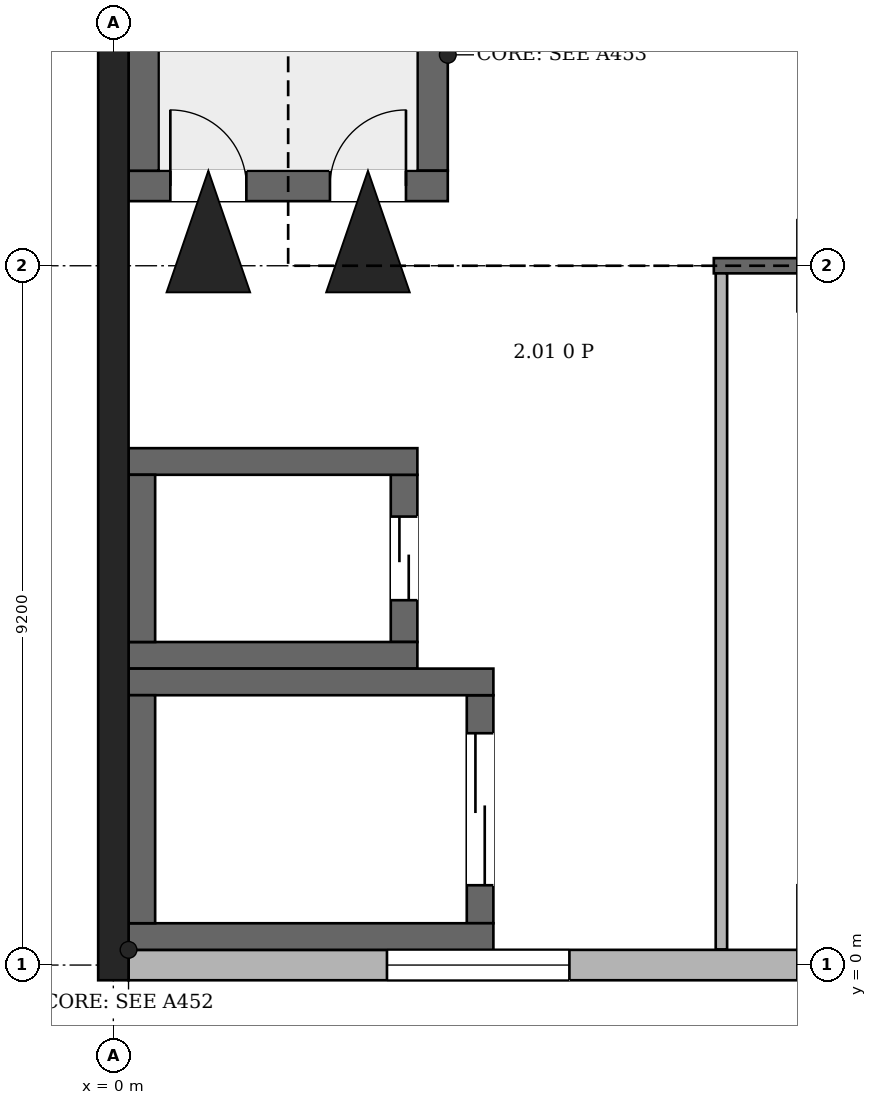
"""IFC4 building model, lengths in metres.
Left out: names, types, materials, properties, quantities, classifications, styles, units other than length and angle.
Written with IfcOpenShell. Run it as: python <this file> out.ifc"""

import sys

from ifc_helpers import new_model, si_unit, direction, frame, frame_2d, origin, place, context, subcontext, project, spatial, rectangle, extrude, element, fill, save


model = new_model("IFC4")
c1 = context("Model", 3, precision=1e-05, world=origin(), true_north=direction((0.0, 1.0)))
c2 = subcontext(c1, "Body", "Model", "MODEL_VIEW")
j1 = project(units=[si_unit("LENGTHUNIT", "METRE"), si_unit("PLANEANGLEUNIT", "RADIAN")], contexts=[c1])
p1 = place(None, origin())
s1 = spatial("IfcSite", under=j1, at=p1, CompositionType="ELEMENT")
p2 = place(p1, origin())
s2 = spatial("IfcBuilding", under=s1, at=p2, CompositionType="ELEMENT")
p3 = place(p2, frame((0.0, 0.0, 14.2)))
s3 = spatial("IfcBuildingStorey", under=s2, at=p3, CompositionType="ELEMENT", Elevation=14.2)
p4 = place(p3, frame((0.0, -0.2, 0.0), z_axis=(0.0, 0.0, 1.0), x_axis=(0.0, 1.0, 0.0)))
e1 = element("IfcWall", 1, at=p4, inside=s3, PredefinedType="SHEAR", context=c2, shape_type="SweptSolid", body=[
    extrude(rectangle(XDim=46.88, YDim=0.4, at=frame_2d((23.44, 0.0))), origin(), (0.0, 0.0, 1.0), 7.5),
])
p5 = place(p3, frame((0.2, 10.25, 0.0), z_axis=(0.0, 0.0, 1.0), x_axis=(1.0, 0.0, 0.0)))
e2 = element("IfcWall", 2, at=p5, inside=s3, PredefinedType="SHEAR", context=c2, shape_type="SweptSolid", body=[
    extrude(rectangle(XDim=4.2, YDim=0.4, at=frame_2d((2.1, 0.0))), origin(), (0.0, 0.0, 1.0), 7.5),
])
p6 = place(p5, frame((0.55, 0.0, 0.0)))
e3 = element("IfcOpeningElement", 3, at=p6, cuts=e2, PredefinedType="OPENING", context=c2, shape_type="SweptSolid", body=[
    extrude(rectangle(XDim=1.0, YDim=2.1, at=frame_2d((0.5, 1.05))), frame((0.0, 0.21, 0.0), z_axis=(0.0, -1.0, 0.0), x_axis=(1.0, 0.0, 0.0)), (0.0, 0.0, 1.0), 0.42),
])
p7 = place(p5, frame((2.65, 0.0, 0.0)))
e4 = element("IfcOpeningElement", 4, at=p7, cuts=e2, PredefinedType="OPENING", context=c2, shape_type="SweptSolid", body=[
    extrude(rectangle(XDim=1.0, YDim=2.1, at=frame_2d((0.5, 1.05))), frame((0.0, 0.21, 0.0), z_axis=(0.0, -1.0, 0.0), x_axis=(1.0, 0.0, 0.0)), (0.0, 0.0, 1.0), 0.42),
])
for number, where, z_axis, x_axis in (
    (5, (0.4, 10.45, 0.0), (0.0, 0.0, 1.0), (0.0, 1.0, 0.0)),
    (6, (4.2, 10.45, 0.0), (0.0, 0.0, 1.0), (0.0, 1.0, 0.0)),
):
    element("IfcWall", number, at=place(p3, frame(where, z_axis=z_axis, x_axis=x_axis)), inside=s3, PredefinedType="SHEAR", context=c2, shape_type="SweptSolid", body=[
        extrude(rectangle(XDim=6.6, YDim=0.4, at=frame_2d((3.3, 0.0))), origin(), (0.0, 0.0, 1.0), 7.5),
    ])
for number, where, z_axis, x_axis in (
    (7, (0.2, 0.375, 0.0), (0.0, 0.0, 1.0), (1.0, 0.0, 0.0)),
    (8, (0.2, 3.725, 0.0), (0.0, 0.0, 1.0), (1.0, 0.0, 0.0)),
):
    element("IfcWall", number, at=place(p3, frame(where, z_axis=z_axis, x_axis=x_axis)), inside=s3, PredefinedType="SHEAR", context=c2, shape_type="SweptSolid", body=[
        extrude(rectangle(XDim=4.8, YDim=0.35, at=frame_2d((2.4, 0.0))), origin(), (0.0, 0.0, 1.0), 7.5),
    ])
p8 = place(p3, frame((0.375, 0.55, 0.0), z_axis=(0.0, 0.0, 1.0), x_axis=(0.0, 1.0, 0.0)))
e9 = element("IfcWall", 9, at=p8, inside=s3, PredefinedType="SHEAR", context=c2, shape_type="SweptSolid", body=[
    extrude(rectangle(XDim=3.0, YDim=0.35, at=frame_2d((1.5, 0.0))), origin(), (0.0, 0.0, 1.0), 7.5),
])
p9 = place(p3, frame((4.825, 0.55, 0.0), z_axis=(0.0, 0.0, 1.0), x_axis=(0.0, 1.0, 0.0)))
e10 = element("IfcWall", 10, at=p9, inside=s3, PredefinedType="SHEAR", context=c2, shape_type="SweptSolid", body=[
    extrude(rectangle(XDim=3.0, YDim=0.35, at=frame_2d((1.5, 0.0))), origin(), (0.0, 0.0, 1.0), 7.5),
])
p10 = place(p9, frame((0.5, 0.0, 0.0)))
e11 = element("IfcOpeningElement", 11, at=p10, cuts=e10, PredefinedType="OPENING", context=c2, shape_type="SweptSolid", body=[
    extrude(rectangle(XDim=2.0, YDim=2.4, at=frame_2d((1.0, 1.2))), frame((0.0, 0.185, 0.0), z_axis=(0.0, -1.0, 0.0), x_axis=(1.0, 0.0, 0.0)), (0.0, 0.0, 1.0), 0.37),
])
for number, where, z_axis, x_axis in (
    (12, (0.2, 4.075, 0.0), (0.0, 0.0, 1.0), (1.0, 0.0, 0.0)),
    (13, (0.2, 6.625, 0.0), (0.0, 0.0, 1.0), (1.0, 0.0, 0.0)),
):
    element("IfcWall", number, at=place(p3, frame(where, z_axis=z_axis, x_axis=x_axis)), inside=s3, PredefinedType="SHEAR", context=c2, shape_type="SweptSolid", body=[
        extrude(rectangle(XDim=3.8, YDim=0.35, at=frame_2d((1.9, 0.0))), origin(), (0.0, 0.0, 1.0), 7.5),
    ])
p11 = place(p3, frame((0.375, 4.25, 0.0), z_axis=(0.0, 0.0, 1.0), x_axis=(0.0, 1.0, 0.0)))
e14 = element("IfcWall", 14, at=p11, inside=s3, PredefinedType="SHEAR", context=c2, shape_type="SweptSolid", body=[
    extrude(rectangle(XDim=2.2, YDim=0.35, at=frame_2d((1.1, 0.0))), origin(), (0.0, 0.0, 1.0), 7.5),
])
p12 = place(p3, frame((3.825, 4.25, 0.0), z_axis=(0.0, 0.0, 1.0), x_axis=(0.0, 1.0, 0.0)))
e15 = element("IfcWall", 15, at=p12, inside=s3, PredefinedType="SHEAR", context=c2, shape_type="SweptSolid", body=[
    extrude(rectangle(XDim=2.2, YDim=0.35, at=frame_2d((1.1, 0.0))), origin(), (0.0, 0.0, 1.0), 7.5),
])
p13 = place(p12, frame((0.55, 0.0, 0.0)))
e16 = element("IfcOpeningElement", 16, at=p13, cuts=e15, PredefinedType="OPENING", context=c2, shape_type="SweptSolid", body=[
    extrude(rectangle(XDim=1.1, YDim=2.1, at=frame_2d((0.55, 1.05))), frame((0.0, 0.185, 0.0), z_axis=(0.0, -1.0, 0.0), x_axis=(1.0, 0.0, 0.0)), (0.0, 0.0, 1.0), 0.37),
])
p14 = place(p3, frame((0.2, 0.0, 0.0), z_axis=(0.0, 0.0, 1.0), x_axis=(1.0, 0.0, 0.0)))
e17 = element("IfcWall", 17, at=p14, inside=s3, PredefinedType="ELEMENTEDWALL", context=c2, shape_type="SweptSolid", body=[
    extrude(rectangle(XDim=8.8, YDim=0.4, at=frame_2d((4.4, 0.0))), origin(), (0.0, 0.0, 1.0), 7.15),
])
p15 = place(p14, frame((3.4, 0.0, 1.0)))
e18 = element("IfcOpeningElement", 18, at=p15, cuts=e17, PredefinedType="OPENING", context=c2, shape_type="SweptSolid", body=[
    extrude(rectangle(XDim=2.4, YDim=2.2, at=frame_2d((1.2, 1.1))), frame((0.0, 0.21, 0.0), z_axis=(0.0, -1.0, 0.0), x_axis=(1.0, 0.0, 0.0)), (0.0, 0.0, 1.0), 0.42),
])
p16 = place(p3, frame((7.9, 9.2, 0.0), z_axis=(0.0, 0.0, 1.0), x_axis=(1.0, 0.0, 0.0)))
e19 = element("IfcWall", 19, at=p16, inside=s3, PredefinedType="PARTITIONING", context=c2, shape_type="SweptSolid", body=[
    extrude(rectangle(XDim=1.1, YDim=0.2, at=frame_2d((0.55, 0.0))), origin(), (0.0, 0.0, 1.0), 6.75),
])
p17 = place(p3, frame((8.0, 0.206, 0.0), z_axis=(0.0, 0.0, 1.0), x_axis=(0.0, 1.0, 0.0)))
e20 = element("IfcWall", 20, at=p17, inside=s3, PredefinedType="PARTITIONING", context=c2, shape_type="SweptSolid", body=[
    extrude(rectangle(XDim=8.894, YDim=0.15, at=frame_2d((4.447, 0.0))), origin(), (0.0, 0.0, 1.0), 7.15),
])
p18 = place(p15, origin())
e21 = element("IfcWindow", 21, at=p18, inside=s3, PartitioningType="SINGLE_PANEL", PredefinedType="WINDOW", context=c2, shape_type="SweptSolid", body=[
    extrude(rectangle(XDim=2.4, YDim=2.2, at=frame_2d((1.2, 1.1))), frame((0.0, 0.03, 0.0), z_axis=(0.0, -1.0, 0.0), x_axis=(1.0, 0.0, 0.0)), (0.0, 0.0, 1.0), 0.06),
])
fill(e18, e21)
p19 = place(p6, origin())
e22 = element("IfcDoor", 22, at=p19, inside=s3, OperationType="SINGLE_SWING_RIGHT", PredefinedType="DOOR", context=c2, shape_type="SweptSolid", body=[
    extrude(rectangle(XDim=1.0, YDim=2.1, at=frame_2d((0.5, 1.05))), frame((0.0, 0.025, 0.0), z_axis=(0.0, -1.0, 0.0), x_axis=(1.0, 0.0, 0.0)), (0.0, 0.0, 1.0), 0.05),
])
fill(e3, e22)
p20 = place(p7, origin())
e23 = element("IfcDoor", 23, at=p20, inside=s3, OperationType="SINGLE_SWING_LEFT", PredefinedType="DOOR", context=c2, shape_type="SweptSolid", body=[
    extrude(rectangle(XDim=1.0, YDim=2.1, at=frame_2d((0.5, 1.05))), frame((0.0, 0.025, 0.0), z_axis=(0.0, -1.0, 0.0), x_axis=(1.0, 0.0, 0.0)), (0.0, 0.0, 1.0), 0.05),
])
fill(e4, e23)
p21 = place(p10, origin())
e24 = element("IfcDoor", 24, at=p21, inside=s3, OperationType="DOUBLE_DOOR_SLIDING", PredefinedType="DOOR", context=c2, shape_type="SweptSolid", body=[
    extrude(rectangle(XDim=2.0, YDim=2.4, at=frame_2d((1.0, 1.2))), frame((0.0, 0.025, 0.0), z_axis=(0.0, -1.0, 0.0), x_axis=(1.0, 0.0, 0.0)), (0.0, 0.0, 1.0), 0.05),
])
fill(e11, e24)
p22 = place(p13, origin())
e25 = element("IfcDoor", 25, at=p22, inside=s3, OperationType="DOUBLE_DOOR_SLIDING", PredefinedType="DOOR", context=c2, shape_type="SweptSolid", body=[
    extrude(rectangle(XDim=1.1, YDim=2.1, at=frame_2d((0.55, 1.05))), frame((0.0, 0.025, 0.0), z_axis=(0.0, -1.0, 0.0), x_axis=(1.0, 0.0, 0.0)), (0.0, 0.0, 1.0), 0.05),
])
fill(e16, e25)
save(model, sys.argv[1])
